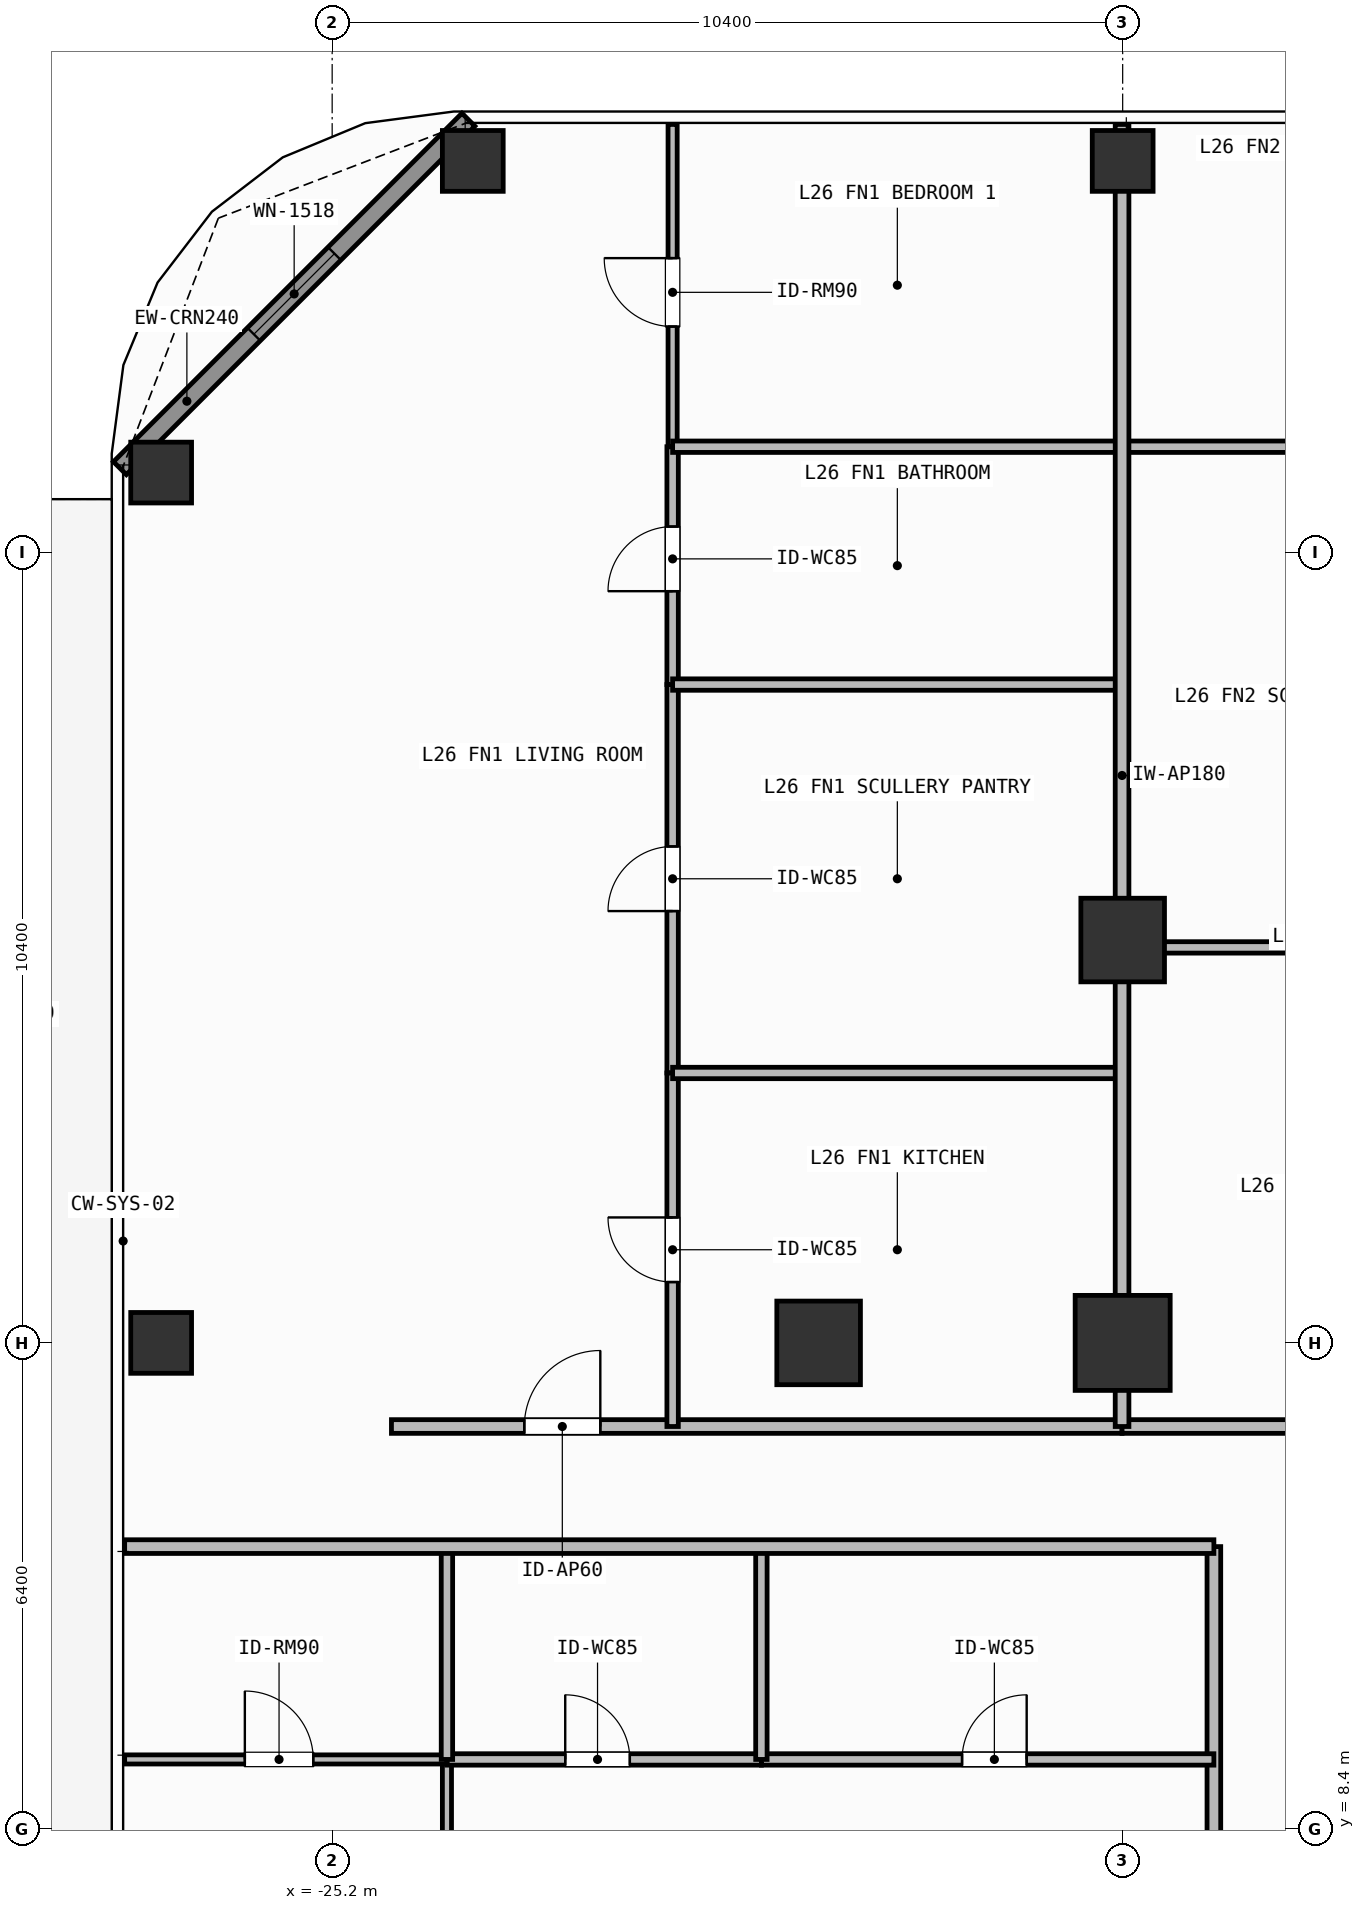
"""IFC4 building model, lengths in metres.
Left out: names, types, materials, properties, quantities, classifications, styles, units other than length and angle.
Written with IfcOpenShell. Run it as: python <this file> out.ifc"""

import sys

from ifc_helpers import new_model, si_unit, direction, frame, frame_2d, origin, origin_2d, place, context, subcontext, project, spatial, rectangle, hollow_rectangle, extrude, element, fill, save


model = new_model("IFC4")
c1 = context("Model", 3, precision=1e-05, world=origin(), true_north=direction((0.0, 1.0)))
c2 = subcontext(c1, "Body", "Model", "MODEL_VIEW")
j1 = project(units=[si_unit("LENGTHUNIT", "METRE"), si_unit("PLANEANGLEUNIT", "RADIAN")], contexts=[c1])
p1 = place(None, origin())
s1 = spatial("IfcSite", under=j1, at=p1, CompositionType="ELEMENT")
p2 = place(p1, origin())
s2 = spatial("IfcBuilding", under=s1, at=p2, CompositionType="ELEMENT")
p3 = place(p2, frame((0.0, 0.0, 104.7)))
s3 = spatial("IfcBuildingStorey", under=s2, at=p3, CompositionType="ELEMENT", Elevation=104.7)
p4 = place(p3, frame((-14.8, 14.8, 0.0), z_axis=(0.0, 0.0, 1.0), x_axis=(1.0, 0.0, 0.0)))
e1 = element("IfcColumn", 1, at=p4, inside=s3, PredefinedType="COLUMN", context=c2, shape_type="SweptSolid", body=[
    extrude(rectangle(XDim=1.25, YDim=1.25, at=origin_2d()), origin(), (0.0, 0.0, 1.0), 3.9),
])
for number, where, z_axis, x_axis in (
    (2, (-18.8, 14.8, 0.0), (0.0, 0.0, 1.0), (1.0, 0.0, 0.0)),
    (3, (-14.8, 20.1, 0.0), (0.0, 0.0, 1.0), (1.0, 0.0, 0.0)),
):
    element("IfcColumn", number, at=place(p3, frame(where, z_axis=z_axis, x_axis=x_axis)), inside=s3, PredefinedType="COLUMN", context=c2, shape_type="SweptSolid", body=[
        extrude(rectangle(XDim=1.1, YDim=1.1, at=origin_2d()), origin(), (0.0, 0.0, 1.0), 3.9),
    ])
for number, where, z_axis, x_axis in (
    (4, (-23.35, 30.35, 0.0), (0.0, 0.0, 1.0), (1.0, 0.0, 0.0)),
    (5, (-27.45, 26.25, 0.0), (0.0, 0.0, 1.0), (1.0, 0.0, 0.0)),
    (6, (-14.8, 30.35, 0.0), (0.0, 0.0, 1.0), (1.0, 0.0, 0.0)),
    (7, (-27.45, 14.8, 0.0), (0.0, 0.0, 1.0), (1.0, 0.0, 0.0)),
):
    element("IfcColumn", number, at=place(p3, frame(where, z_axis=z_axis, x_axis=x_axis)), inside=s3, PredefinedType="COLUMN", context=c2, shape_type="SweptSolid", body=[
        extrude(hollow_rectangle(XDim=0.8, YDim=0.8, WallThickness=0.036, at=origin_2d()), origin(), (0.0, 0.0, 1.0), 3.9),
    ])
p5 = place(p3, frame((-27.992, 26.308, 0.0), z_axis=(0.0, 0.0, 1.0), x_axis=(0.707106781187, 0.707106781187, 0.0)))
e8 = element("IfcWall", 8, at=p5, inside=s3, PredefinedType="SOLIDWALL", context=c2, shape_type="SweptSolid", body=[
    extrude(rectangle(XDim=6.484, YDim=0.24, at=frame_2d((3.242, 0.0))), origin(), (0.0, 0.0, 1.0), 3.62),
])
p6 = place(p5, frame((2.492, 0.0, 0.8)))
e9 = element("IfcOpeningElement", 9, at=p6, cuts=e8, PredefinedType="OPENING", context=c2, shape_type="SweptSolid", body=[
    extrude(rectangle(XDim=1.5, YDim=1.85, at=frame_2d((0.75, 0.925))), frame((0.0, 0.13, 0.0), z_axis=(0.0, -1.0, 0.0), x_axis=(1.0, 0.0, 0.0)), (0.0, 0.0, 1.0), 0.26),
])
p7 = place(p3, frame((-24.42, 13.7, 0.0), z_axis=(0.0, 0.0, 1.0), x_axis=(1.0, 0.0, 0.0)))
e10 = element("IfcWall", 10, at=p7, inside=s3, PredefinedType="PARTITIONING", context=c2, shape_type="SweptSolid", body=[
    extrude(rectangle(XDim=9.612, YDim=0.18, at=frame_2d((4.806, 0.0))), origin(), (0.0, 0.0, 1.0), 3.62),
])
p8 = place(p7, frame((1.748, 0.0, 0.0)))
e11 = element("IfcOpeningElement", 11, at=p8, cuts=e10, PredefinedType="OPENING", context=c2, shape_type="SweptSolid", body=[
    extrude(rectangle(XDim=1.0, YDim=2.2, at=frame_2d((0.5, 1.1))), frame((0.0, 0.1, 0.0), z_axis=(0.0, -1.0, 0.0), x_axis=(1.0, 0.0, 0.0)), (0.0, 0.0, 1.0), 0.2),
])
p9 = place(p3, frame((-20.721, 18.351, 0.0), z_axis=(0.0, 0.0, 1.0), x_axis=(0.0, 1.0, 0.0)))
e12 = element("IfcWall", 12, at=p9, inside=s3, PredefinedType="PARTITIONING", context=c2, shape_type="SweptSolid", body=[
    extrude(rectangle(XDim=5.11, YDim=0.15, at=frame_2d((2.555, 0.0))), origin(), (0.0, 0.0, 1.0), 3.62),
])
p10 = place(p9, frame((2.13, 0.0, 0.0)))
e13 = element("IfcOpeningElement", 13, at=p10, cuts=e12, PredefinedType="OPENING", context=c2, shape_type="SweptSolid", body=[
    extrude(rectangle(XDim=0.85, YDim=2.1, at=frame_2d((0.425, 1.05))), frame((0.0, 0.085, 0.0), z_axis=(0.0, -1.0, 0.0), x_axis=(1.0, 0.0, 0.0)), (0.0, 0.0, 1.0), 0.17),
])
p11 = place(p3, frame((-20.721, 13.7, 0.0), z_axis=(0.0, 0.0, 1.0), x_axis=(0.0, 1.0, 0.0)))
e14 = element("IfcWall", 14, at=p11, inside=s3, PredefinedType="PARTITIONING", context=c2, shape_type="SweptSolid", body=[
    extrude(rectangle(XDim=4.651, YDim=0.15, at=frame_2d((2.326, 0.0))), origin(), (0.0, 0.0, 1.0), 3.62),
])
p12 = place(p11, frame((1.9, 0.0, 0.0)))
e15 = element("IfcOpeningElement", 15, at=p12, cuts=e14, PredefinedType="OPENING", context=c2, shape_type="SweptSolid", body=[
    extrude(rectangle(XDim=0.85, YDim=2.1, at=frame_2d((0.425, 1.05))), frame((0.0, 0.085, 0.0), z_axis=(0.0, -1.0, 0.0), x_axis=(1.0, 0.0, 0.0)), (0.0, 0.0, 1.0), 0.17),
])
p13 = place(p3, frame((-20.721, 23.461, 0.0), z_axis=(0.0, 0.0, 1.0), x_axis=(0.0, 1.0, 0.0)))
e16 = element("IfcWall", 16, at=p13, inside=s3, PredefinedType="PARTITIONING", context=c2, shape_type="SweptSolid", body=[
    extrude(rectangle(XDim=3.129, YDim=0.15, at=frame_2d((1.564, 0.0))), origin(), (0.0, 0.0, 1.0), 3.62),
])
p14 = place(p13, frame((1.229, 0.0, 0.0)))
e17 = element("IfcOpeningElement", 17, at=p14, cuts=e16, PredefinedType="OPENING", context=c2, shape_type="SweptSolid", body=[
    extrude(rectangle(XDim=0.85, YDim=2.1, at=frame_2d((0.425, 1.05))), frame((0.0, 0.085, 0.0), z_axis=(0.0, -1.0, 0.0), x_axis=(1.0, 0.0, 0.0)), (0.0, 0.0, 1.0), 0.17),
])
p15 = place(p3, frame((-20.721, 26.59, 0.0), z_axis=(0.0, 0.0, 1.0), x_axis=(0.0, 1.0, 0.0)))
e18 = element("IfcWall", 18, at=p15, inside=s3, PredefinedType="PARTITIONING", context=c2, shape_type="SweptSolid", body=[
    extrude(rectangle(XDim=4.24, YDim=0.12, at=frame_2d((2.12, 0.0))), origin(), (0.0, 0.0, 1.0), 3.62),
])
p16 = place(p15, frame((1.581, 0.0, 0.0)))
e19 = element("IfcOpeningElement", 19, at=p16, cuts=e18, PredefinedType="OPENING", context=c2, shape_type="SweptSolid", body=[
    extrude(rectangle(XDim=0.9, YDim=2.1, at=frame_2d((0.45, 1.05))), frame((0.0, 0.07, 0.0), z_axis=(0.0, -1.0, 0.0), x_axis=(1.0, 0.0, 0.0)), (0.0, 0.0, 1.0), 0.14),
])
p17 = place(p3, frame((-14.808, 13.7, 0.0), z_axis=(0.0, 0.0, 1.0), x_axis=(1.0, 0.0, 0.0)))
e20 = element("IfcWall", 20, at=p17, inside=s3, PredefinedType="PARTITIONING", context=c2, shape_type="SweptSolid", body=[
    extrude(rectangle(XDim=21.212, YDim=0.18, at=frame_2d((10.606, 0.0))), origin(), (0.0, 0.0, 1.0), 3.62),
])
p18 = place(p17, frame((11.271, 0.0, 0.0)))
e21 = element("IfcOpeningElement", 21, at=p18, cuts=e20, PredefinedType="OPENING", context=c2, shape_type="SweptSolid", body=[
    extrude(rectangle(XDim=1.0, YDim=2.2, at=frame_2d((0.5, 1.1))), frame((0.0, 0.1, 0.0), z_axis=(0.0, -1.0, 0.0), x_axis=(1.0, 0.0, 0.0)), (0.0, 0.0, 1.0), 0.2),
])
p19 = place(p3, frame((-13.6, -1.6, 0.0), z_axis=(0.0, 0.0, 1.0), x_axis=(0.0, 1.0, 0.0)))
e22 = element("IfcWall", 22, at=p19, inside=s3, PredefinedType="PARTITIONING", context=c2, shape_type="SweptSolid", body=[
    extrude(rectangle(XDim=13.72, YDim=0.18, at=frame_2d((6.86, 0.0))), origin(), (0.0, 0.0, 1.0), 3.62),
])
p20 = place(p19, frame((6.989, 0.0, 0.0)))
e23 = element("IfcOpeningElement", 23, at=p20, cuts=e22, PredefinedType="OPENING", context=c2, shape_type="SweptSolid", body=[
    extrude(rectangle(XDim=1.0, YDim=2.2, at=frame_2d((0.5, 1.1))), frame((0.0, 0.1, 0.0), z_axis=(0.0, -1.0, 0.0), x_axis=(1.0, 0.0, 0.0)), (0.0, 0.0, 1.0), 0.2),
])
p21 = place(p3, frame((-23.69, 2.591, 0.0), z_axis=(0.0, 0.0, 1.0), x_axis=(0.0, 1.0, 0.0)))
e24 = element("IfcWall", 24, at=p21, inside=s3, PredefinedType="PARTITIONING", context=c2, shape_type="SweptSolid", body=[
    extrude(rectangle(XDim=6.729, YDim=0.12, at=frame_2d((3.365, 0.0))), origin(), (0.0, 0.0, 1.0), 3.62),
])
p22 = place(p21, frame((2.826, 0.0, 0.0)))
e25 = element("IfcOpeningElement", 25, at=p22, cuts=e24, PredefinedType="OPENING", context=c2, shape_type="SweptSolid", body=[
    extrude(rectangle(XDim=0.9, YDim=2.1, at=frame_2d((0.45, 1.05))), frame((0.0, 0.07, 0.0), z_axis=(0.0, -1.0, 0.0), x_axis=(1.0, 0.0, 0.0)), (0.0, 0.0, 1.0), 0.14),
])
p23 = place(p3, frame((-23.69, 9.32, 0.0), z_axis=(0.0, 0.0, 1.0), x_axis=(1.0, 0.0, 0.0)))
e26 = element("IfcWall", 26, at=p23, inside=s3, PredefinedType="PARTITIONING", context=c2, shape_type="SweptSolid", body=[
    extrude(rectangle(XDim=4.137, YDim=0.15, at=frame_2d((2.068, 0.0))), origin(), (0.0, 0.0, 1.0), 3.62),
])
p24 = place(p23, frame((1.556, 0.0, 0.0)))
e27 = element("IfcOpeningElement", 27, at=p24, cuts=e26, PredefinedType="OPENING", context=c2, shape_type="SweptSolid", body=[
    extrude(rectangle(XDim=0.85, YDim=2.1, at=frame_2d((0.425, 1.05))), frame((0.0, 0.085, 0.0), z_axis=(0.0, -1.0, 0.0), x_axis=(1.0, 0.0, 0.0)), (0.0, 0.0, 1.0), 0.17),
])
p25 = place(p3, frame((-19.553, 9.32, 0.0), z_axis=(0.0, 0.0, 1.0), x_axis=(1.0, 0.0, 0.0)))
e28 = element("IfcWall", 28, at=p25, inside=s3, PredefinedType="PARTITIONING", context=c2, shape_type="SweptSolid", body=[
    extrude(rectangle(XDim=5.953, YDim=0.15, at=frame_2d((2.977, 0.0))), origin(), (0.0, 0.0, 1.0), 3.62),
])
p26 = place(p25, frame((2.64, 0.0, 0.0)))
e29 = element("IfcOpeningElement", 29, at=p26, cuts=e28, PredefinedType="OPENING", context=c2, shape_type="SweptSolid", body=[
    extrude(rectangle(XDim=0.85, YDim=2.1, at=frame_2d((0.425, 1.05))), frame((0.0, 0.085, 0.0), z_axis=(0.0, -1.0, 0.0), x_axis=(1.0, 0.0, 0.0)), (0.0, 0.0, 1.0), 0.17),
])
p27 = place(p3, frame((-27.93, 9.32, 0.0), z_axis=(0.0, 0.0, 1.0), x_axis=(1.0, 0.0, 0.0)))
e30 = element("IfcWall", 30, at=p27, inside=s3, PredefinedType="PARTITIONING", context=c2, shape_type="SweptSolid", body=[
    extrude(rectangle(XDim=4.24, YDim=0.12, at=frame_2d((2.12, 0.0))), origin(), (0.0, 0.0, 1.0), 3.62),
])
p28 = place(p27, frame((1.581, 0.0, 0.0)))
e31 = element("IfcOpeningElement", 31, at=p28, cuts=e30, PredefinedType="OPENING", context=c2, shape_type="SweptSolid", body=[
    extrude(rectangle(XDim=0.9, YDim=2.1, at=frame_2d((0.45, 1.05))), frame((0.0, 0.07, 0.0), z_axis=(0.0, -1.0, 0.0), x_axis=(1.0, 0.0, 0.0)), (0.0, 0.0, 1.0), 0.14),
])
for number, where, z_axis, x_axis in (
    (32, (-20.721, 18.351, 0.0), (0.0, 0.0, 1.0), (1.0, 0.0, 0.0)),
    (33, (-20.721, 23.461, 0.0), (0.0, 0.0, 1.0), (1.0, 0.0, 0.0)),
    (34, (-20.721, 26.59, 0.0), (0.0, 0.0, 1.0), (1.0, 0.0, 0.0)),
):
    element("IfcWall", number, at=place(p3, frame(where, z_axis=z_axis, x_axis=x_axis)), inside=s3, PredefinedType="PARTITIONING", context=c2, shape_type="SweptSolid", body=[
        extrude(rectangle(XDim=5.913, YDim=0.15, at=frame_2d((2.957, 0.0))), origin(), (0.0, 0.0, 1.0), 3.62),
    ])
p29 = place(p3, frame((-14.808, 20.003, 0.0), z_axis=(0.0, 0.0, 1.0), x_axis=(1.0, 0.0, 0.0)))
e35 = element("IfcWall", 35, at=p29, inside=s3, PredefinedType="PARTITIONING", context=c2, shape_type="SweptSolid", body=[
    extrude(rectangle(XDim=5.394, YDim=0.15, at=frame_2d((2.697, 0.0))), origin(), (0.0, 0.0, 1.0), 2.71),
])
p30 = place(p3, frame((-14.808, 26.59, 0.0), z_axis=(0.0, 0.0, 1.0), x_axis=(1.0, 0.0, 0.0)))
e36 = element("IfcWall", 36, at=p30, inside=s3, PredefinedType="PARTITIONING", context=c2, shape_type="SweptSolid", body=[
    extrude(rectangle(XDim=5.394, YDim=0.15, at=frame_2d((2.697, 0.0))), origin(), (0.0, 0.0, 1.0), 3.62),
])
p31 = place(p3, frame((-14.808, 13.7, 0.0), z_axis=(0.0, 0.0, 1.0), x_axis=(0.0, 1.0, 0.0)))
e37 = element("IfcWall", 37, at=p31, inside=s3, PredefinedType="PARTITIONING", context=c2, shape_type="SweptSolid", body=[
    extrude(rectangle(XDim=17.13, YDim=0.18, at=frame_2d((8.565, 0.0))), origin(), (0.0, 0.0, 1.0), 2.71),
])
for number, where, z_axis, x_axis in (
    (38, (-19.553, 9.32, 0.0), (0.0, 0.0, 1.0), (0.0, 1.0, 0.0)),
    (39, (-23.69, 9.32, 0.0), (0.0, 0.0, 1.0), (0.0, 1.0, 0.0)),
):
    element("IfcWall", number, at=place(p3, frame(where, z_axis=z_axis, x_axis=x_axis)), inside=s3, PredefinedType="PARTITIONING", context=c2, shape_type="SweptSolid", body=[
        extrude(rectangle(XDim=2.8, YDim=0.15, at=frame_2d((1.4, 0.0))), origin(), (0.0, 0.0, 1.0), 3.62),
    ])
p32 = place(p3, frame((-27.93, 12.12, 0.0), z_axis=(0.0, 0.0, 1.0), x_axis=(1.0, 0.0, 0.0)))
e40 = element("IfcWall", 40, at=p32, inside=s3, PredefinedType="PARTITIONING", context=c2, shape_type="SweptSolid", body=[
    extrude(rectangle(XDim=14.33, YDim=0.18, at=frame_2d((7.165, 0.0))), origin(), (0.0, 0.0, 1.0), 3.62),
])
p33 = place(p6, origin())
e41 = element("IfcWindow", 41, at=p33, inside=s3, PartitioningType="SINGLE_PANEL", PredefinedType="WINDOW", context=c2, shape_type="SweptSolid", body=[
    extrude(rectangle(XDim=1.5, YDim=1.85, at=frame_2d((0.75, 0.925))), frame((0.0, 0.03, 0.0), z_axis=(0.0, -1.0, 0.0), x_axis=(1.0, 0.0, 0.0)), (0.0, 0.0, 1.0), 0.06),
])
fill(e9, e41)
p34 = place(p8, origin())
e42 = element("IfcDoor", 42, at=p34, inside=s3, OperationType="SINGLE_SWING_RIGHT", PredefinedType="DOOR", context=c2, shape_type="SweptSolid", body=[
    extrude(rectangle(XDim=1.0, YDim=2.2, at=frame_2d((0.5, 1.1))), frame((0.0, 0.025, 0.0), z_axis=(0.0, -1.0, 0.0), x_axis=(1.0, 0.0, 0.0)), (0.0, 0.0, 1.0), 0.05),
])
fill(e11, e42)
p35 = place(p10, origin())
e43 = element("IfcDoor", 43, at=p35, inside=s3, OperationType="SINGLE_SWING_LEFT", PredefinedType="DOOR", context=c2, shape_type="SweptSolid", body=[
    extrude(rectangle(XDim=0.85, YDim=2.1, at=frame_2d((0.425, 1.05))), frame((0.0, 0.025, 0.0), z_axis=(0.0, -1.0, 0.0), x_axis=(1.0, 0.0, 0.0)), (0.0, 0.0, 1.0), 0.05),
])
fill(e13, e43)
p36 = place(p12, origin())
e44 = element("IfcDoor", 44, at=p36, inside=s3, OperationType="SINGLE_SWING_RIGHT", PredefinedType="DOOR", context=c2, shape_type="SweptSolid", body=[
    extrude(rectangle(XDim=0.85, YDim=2.1, at=frame_2d((0.425, 1.05))), frame((0.0, 0.025, 0.0), z_axis=(0.0, -1.0, 0.0), x_axis=(1.0, 0.0, 0.0)), (0.0, 0.0, 1.0), 0.05),
])
fill(e15, e44)
p37 = place(p14, origin())
e45 = element("IfcDoor", 45, at=p37, inside=s3, OperationType="SINGLE_SWING_LEFT", PredefinedType="DOOR", context=c2, shape_type="SweptSolid", body=[
    extrude(rectangle(XDim=0.85, YDim=2.1, at=frame_2d((0.425, 1.05))), frame((0.0, 0.025, 0.0), z_axis=(0.0, -1.0, 0.0), x_axis=(1.0, 0.0, 0.0)), (0.0, 0.0, 1.0), 0.05),
])
fill(e17, e45)
p38 = place(p16, origin())
e46 = element("IfcDoor", 46, at=p38, inside=s3, OperationType="SINGLE_SWING_RIGHT", PredefinedType="DOOR", context=c2, shape_type="SweptSolid", body=[
    extrude(rectangle(XDim=0.9, YDim=2.1, at=frame_2d((0.45, 1.05))), frame((0.0, 0.025, 0.0), z_axis=(0.0, -1.0, 0.0), x_axis=(1.0, 0.0, 0.0)), (0.0, 0.0, 1.0), 0.05),
])
fill(e19, e46)
p39 = place(p24, origin())
e47 = element("IfcDoor", 47, at=p39, inside=s3, OperationType="SINGLE_SWING_LEFT", PredefinedType="DOOR", context=c2, shape_type="SweptSolid", body=[
    extrude(rectangle(XDim=0.85, YDim=2.1, at=frame_2d((0.425, 1.05))), frame((0.0, 0.025, 0.0), z_axis=(0.0, -1.0, 0.0), x_axis=(1.0, 0.0, 0.0)), (0.0, 0.0, 1.0), 0.05),
])
fill(e27, e47)
p40 = place(p26, origin())
e48 = element("IfcDoor", 48, at=p40, inside=s3, OperationType="SINGLE_SWING_RIGHT", PredefinedType="DOOR", context=c2, shape_type="SweptSolid", body=[
    extrude(rectangle(XDim=0.85, YDim=2.1, at=frame_2d((0.425, 1.05))), frame((0.0, 0.025, 0.0), z_axis=(0.0, -1.0, 0.0), x_axis=(1.0, 0.0, 0.0)), (0.0, 0.0, 1.0), 0.05),
])
fill(e29, e48)
p41 = place(p28, origin())
e49 = element("IfcDoor", 49, at=p41, inside=s3, OperationType="SINGLE_SWING_LEFT", PredefinedType="DOOR", context=c2, shape_type="SweptSolid", body=[
    extrude(rectangle(XDim=0.9, YDim=2.1, at=frame_2d((0.45, 1.05))), frame((0.0, 0.025, 0.0), z_axis=(0.0, -1.0, 0.0), x_axis=(1.0, 0.0, 0.0)), (0.0, 0.0, 1.0), 0.05),
])
fill(e31, e49)
save(model, sys.argv[1])
